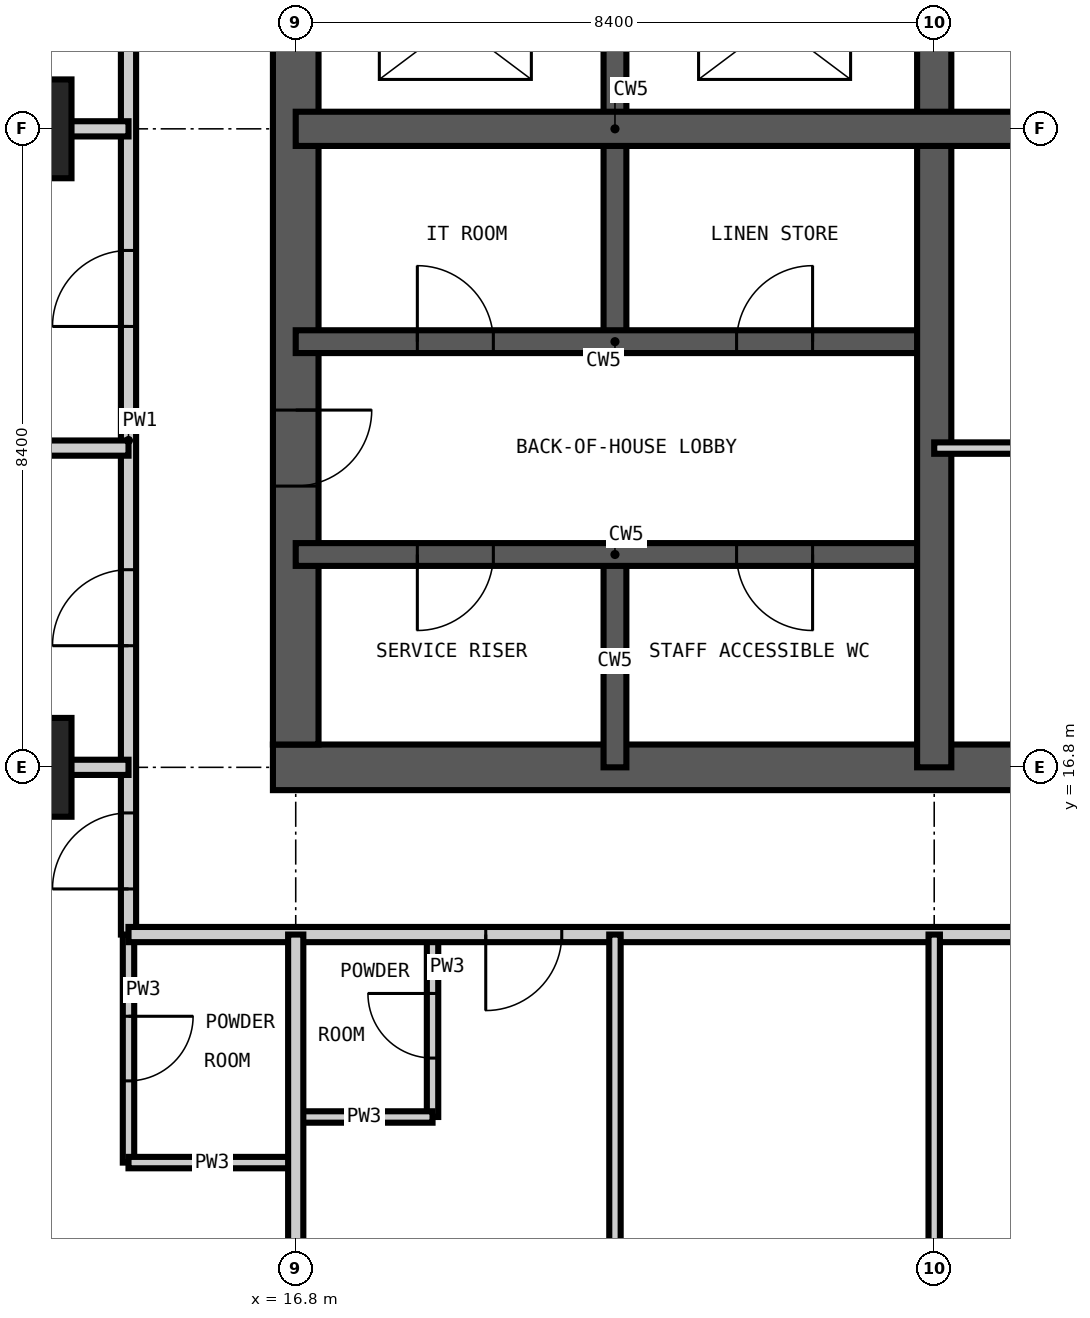
"""IFC4 building model, lengths in metres.
Left out: names, types, materials, properties, quantities, classifications, styles, units other than length and angle.
Written with IfcOpenShell. Run it as: python <this file> out.ifc"""

import sys

from ifc_helpers import new_model, si_unit, direction, frame, frame_2d, origin, origin_2d, place, context, subcontext, project, spatial, rectangle, extrude, element, fill, save


model = new_model("IFC4")
c1 = context("Model", 3, precision=1e-05, world=origin(), true_north=direction((0.0, 1.0)))
c2 = subcontext(c1, "Body", "Model", "MODEL_VIEW")
j1 = project(units=[si_unit("LENGTHUNIT", "METRE"), si_unit("PLANEANGLEUNIT", "RADIAN")], contexts=[c1])
p1 = place(None, origin())
s1 = spatial("IfcSite", under=j1, at=p1, CompositionType="ELEMENT")
p2 = place(p1, origin())
s2 = spatial("IfcBuilding", under=s1, at=p2, CompositionType="ELEMENT")
p3 = place(p2, frame((0.0, 0.0, 205.8)))
s3 = spatial("IfcBuildingStorey", under=s2, at=p3, CompositionType="ELEMENT", Elevation=205.8)
for number, where, z_axis, x_axis in (
    (1, (13.2, 16.8, -0.35), (0.0, 0.0, 1.0), (1.0, 0.0, 0.0)),
    (2, (13.2, 25.2, -0.35), (0.0, 0.0, 1.0), (1.0, 0.0, 0.0)),
):
    element("IfcColumn", number, at=place(p3, frame(where, z_axis=z_axis, x_axis=x_axis)), inside=s3, PredefinedType="COLUMN", context=c2, shape_type="SweptSolid", body=[
        extrude(rectangle(XDim=1.3, YDim=1.3, at=origin_2d()), origin(), (0.0, 0.0, 1.0), 3.6),
    ])
p4 = place(p3, frame((16.5, 16.8, -0.35), z_axis=(0.0, 0.0, 1.0), x_axis=(1.0, 0.0, 0.0)))
e3 = element("IfcWall", 3, at=p4, inside=s3, PredefinedType="SHEAR", context=c2, shape_type="SweptSolid", body=[
    extrude(rectangle(XDim=25.8, YDim=0.6, at=frame_2d((12.9, 0.0))), origin(), (0.0, 0.0, 1.0), 3.6),
])
p5 = place(p4, frame((12.4, 0.0, 0.35)))
e4 = element("IfcOpeningElement", 4, at=p5, cuts=e3, PredefinedType="OPENING", context=c2, shape_type="SweptSolid", body=[
    extrude(rectangle(XDim=1.0, YDim=2.1, at=frame_2d((0.5, 1.05))), frame((0.0, 0.31, 0.0), z_axis=(0.0, -1.0, 0.0), x_axis=(1.0, 0.0, 0.0)), (0.0, 0.0, 1.0), 0.62),
])
p6 = place(p4, frame((18.7, 0.0, 0.35)))
e5 = element("IfcOpeningElement", 5, at=p6, cuts=e3, PredefinedType="OPENING", context=c2, shape_type="SweptSolid", body=[
    extrude(rectangle(XDim=1.0, YDim=2.1, at=frame_2d((0.5, 1.05))), frame((0.0, 0.31, 0.0), z_axis=(0.0, -1.0, 0.0), x_axis=(1.0, 0.0, 0.0)), (0.0, 0.0, 1.0), 0.62),
])
p7 = place(p3, frame((16.8, 41.7, -0.35), z_axis=(0.0, 0.0, 1.0), x_axis=(0.0, -1.0, 0.0)))
e6 = element("IfcWall", 6, at=p7, inside=s3, PredefinedType="SHEAR", context=c2, shape_type="SweptSolid", body=[
    extrude(rectangle(XDim=24.6, YDim=0.6, at=frame_2d((12.3, 0.0))), origin(), (0.0, 0.0, 1.0), 3.6),
])
p8 = place(p7, frame((11.4, 0.0, 0.35)))
e7 = element("IfcOpeningElement", 7, at=p8, cuts=e6, PredefinedType="OPENING", context=c2, shape_type="SweptSolid", body=[
    extrude(rectangle(XDim=1.8, YDim=2.2, at=frame_2d((0.9, 1.1))), frame((0.0, 0.31, 0.0), z_axis=(0.0, -1.0, 0.0), x_axis=(1.0, 0.0, 0.0)), (0.0, 0.0, 1.0), 0.62),
])
p9 = place(p7, frame((20.2, 0.0, 0.35)))
e8 = element("IfcOpeningElement", 8, at=p9, cuts=e6, PredefinedType="OPENING", context=c2, shape_type="SweptSolid", body=[
    extrude(rectangle(XDim=1.0, YDim=2.1, at=frame_2d((0.5, 1.05))), frame((0.0, 0.31, 0.0), z_axis=(0.0, -1.0, 0.0), x_axis=(1.0, 0.0, 0.0)), (0.0, 0.0, 1.0), 0.62),
])
p10 = place(p7, frame((5.5, 0.0, 0.35)))
e9 = element("IfcOpeningElement", 9, at=p10, cuts=e6, PredefinedType="OPENING", context=c2, shape_type="SweptSolid", body=[
    extrude(rectangle(XDim=1.0, YDim=2.1, at=frame_2d((0.5, 1.05))), frame((0.0, 0.31, 0.0), z_axis=(0.0, -1.0, 0.0), x_axis=(1.0, 0.0, 0.0)), (0.0, 0.0, 1.0), 0.62),
])
p11 = place(p3, frame((21.0, 16.8, -0.35), z_axis=(0.0, 0.0, 1.0), x_axis=(0.0, 1.0, 0.0)))
e10 = element("IfcWall", 10, at=p11, inside=s3, PredefinedType="SHEAR", context=c2, shape_type="SweptSolid", body=[
    extrude(rectangle(XDim=2.8, YDim=0.3, at=frame_2d((1.4, 0.0))), origin(), (0.0, 0.0, 1.0), 3.6),
])
p12 = place(p3, frame((21.0, 22.4, -0.35), z_axis=(0.0, 0.0, 1.0), x_axis=(0.0, 1.0, 0.0)))
e11 = element("IfcWall", 11, at=p12, inside=s3, PredefinedType="SHEAR", context=c2, shape_type="SweptSolid", body=[
    extrude(rectangle(XDim=5.6, YDim=0.3, at=frame_2d((2.8, 0.0))), origin(), (0.0, 0.0, 1.0), 3.6),
])
p13 = place(p3, frame((16.8, 19.6, -0.35), z_axis=(0.0, 0.0, 1.0), x_axis=(1.0, 0.0, 0.0)))
e12 = element("IfcWall", 12, at=p13, inside=s3, PredefinedType="SHEAR", context=c2, shape_type="SweptSolid", body=[
    extrude(rectangle(XDim=8.4, YDim=0.3, at=frame_2d((4.2, 0.0))), origin(), (0.0, 0.0, 1.0), 3.6),
])
p14 = place(p13, frame((1.6, 0.0, 0.35)))
e13 = element("IfcOpeningElement", 13, at=p14, cuts=e12, PredefinedType="OPENING", context=c2, shape_type="SweptSolid", body=[
    extrude(rectangle(XDim=1.0, YDim=2.1, at=frame_2d((0.5, 1.05))), frame((0.0, 0.16, 0.0), z_axis=(0.0, -1.0, 0.0), x_axis=(1.0, 0.0, 0.0)), (0.0, 0.0, 1.0), 0.32),
])
p15 = place(p13, frame((5.8, 0.0, 0.35)))
e14 = element("IfcOpeningElement", 14, at=p15, cuts=e12, PredefinedType="OPENING", context=c2, shape_type="SweptSolid", body=[
    extrude(rectangle(XDim=1.0, YDim=2.1, at=frame_2d((0.5, 1.05))), frame((0.0, 0.16, 0.0), z_axis=(0.0, -1.0, 0.0), x_axis=(1.0, 0.0, 0.0)), (0.0, 0.0, 1.0), 0.32),
])
p16 = place(p3, frame((16.8, 22.4, -0.35), z_axis=(0.0, 0.0, 1.0), x_axis=(1.0, 0.0, 0.0)))
e15 = element("IfcWall", 15, at=p16, inside=s3, PredefinedType="SHEAR", context=c2, shape_type="SweptSolid", body=[
    extrude(rectangle(XDim=8.4, YDim=0.3, at=frame_2d((4.2, 0.0))), origin(), (0.0, 0.0, 1.0), 3.6),
])
p17 = place(p16, frame((1.6, 0.0, 0.35)))
e16 = element("IfcOpeningElement", 16, at=p17, cuts=e15, PredefinedType="OPENING", context=c2, shape_type="SweptSolid", body=[
    extrude(rectangle(XDim=1.0, YDim=2.1, at=frame_2d((0.5, 1.05))), frame((0.0, 0.16, 0.0), z_axis=(0.0, -1.0, 0.0), x_axis=(1.0, 0.0, 0.0)), (0.0, 0.0, 1.0), 0.32),
])
p18 = place(p16, frame((5.8, 0.0, 0.35)))
e17 = element("IfcOpeningElement", 17, at=p18, cuts=e15, PredefinedType="OPENING", context=c2, shape_type="SweptSolid", body=[
    extrude(rectangle(XDim=1.0, YDim=2.1, at=frame_2d((0.5, 1.05))), frame((0.0, 0.16, 0.0), z_axis=(0.0, -1.0, 0.0), x_axis=(1.0, 0.0, 0.0)), (0.0, 0.0, 1.0), 0.32),
])
for number, where, z_axis, x_axis in (
    (18, (25.2, 16.8, -0.35), (0.0, 0.0, 1.0), (0.0, 1.0, 0.0)),
    (19, (16.8, 25.2, -0.35), (0.0, 0.0, 1.0), (1.0, 0.0, 0.0)),
):
    element("IfcWall", number, at=place(p3, frame(where, z_axis=z_axis, x_axis=x_axis)), inside=s3, PredefinedType="SHEAR", context=c2, shape_type="SweptSolid", body=[
        extrude(rectangle(XDim=25.2, YDim=0.45, at=frame_2d((12.6, 0.0))), origin(), (0.0, 0.0, 1.0), 3.6),
    ])
p19 = place(p3, frame((14.6, 11.6, 0.0), z_axis=(0.0, 0.0, 1.0), x_axis=(0.0, 1.0, 0.0)))
e20 = element("IfcWall", 20, at=p19, inside=s3, PredefinedType="PARTITIONING", context=c2, shape_type="SweptSolid", body=[
    extrude(rectangle(XDim=3.0, YDim=0.15, at=frame_2d((1.5, 0.0))), origin(), (0.0, 0.0, 1.0), 3.25),
])
p20 = place(p19, frame((1.075, 0.0, 0.0)))
e21 = element("IfcOpeningElement", 21, at=p20, cuts=e20, PredefinedType="OPENING", context=c2, shape_type="SweptSolid", body=[
    extrude(rectangle(XDim=0.85, YDim=2.1, at=frame_2d((0.425, 1.05))), frame((0.0, 0.085, 0.0), z_axis=(0.0, -1.0, 0.0), x_axis=(1.0, 0.0, 0.0)), (0.0, 0.0, 1.0), 0.17),
])
p21 = place(p3, frame((18.6, 12.2, 0.0), z_axis=(0.0, 0.0, 1.0), x_axis=(0.0, 1.0, 0.0)))
e22 = element("IfcWall", 22, at=p21, inside=s3, PredefinedType="PARTITIONING", context=c2, shape_type="SweptSolid", body=[
    extrude(rectangle(XDim=2.4, YDim=0.15, at=frame_2d((1.2, 0.0))), origin(), (0.0, 0.0, 1.0), 3.25),
])
p22 = place(p21, frame((0.775, 0.0, 0.0)))
e23 = element("IfcOpeningElement", 23, at=p22, cuts=e22, PredefinedType="OPENING", context=c2, shape_type="SweptSolid", body=[
    extrude(rectangle(XDim=0.85, YDim=2.1, at=frame_2d((0.425, 1.05))), frame((0.0, 0.085, 0.0), z_axis=(0.0, -1.0, 0.0), x_axis=(1.0, 0.0, 0.0)), (0.0, 0.0, 1.0), 0.17),
])
p23 = place(p3, frame((14.6, 11.6, 0.0), z_axis=(0.0, 0.0, 1.0), x_axis=(1.0, 0.0, 0.0)))
e24 = element("IfcWall", 24, at=p23, inside=s3, PredefinedType="PARTITIONING", context=c2, shape_type="SweptSolid", body=[
    extrude(rectangle(XDim=2.2, YDim=0.15, at=frame_2d((1.1, 0.0))), origin(), (0.0, 0.0, 1.0), 3.25),
])
p24 = place(p3, frame((16.8, 12.2, 0.0), z_axis=(0.0, 0.0, 1.0), x_axis=(1.0, 0.0, 0.0)))
e25 = element("IfcWall", 25, at=p24, inside=s3, PredefinedType="PARTITIONING", context=c2, shape_type="SweptSolid", body=[
    extrude(rectangle(XDim=1.8, YDim=0.15, at=frame_2d((0.9, 0.0))), origin(), (0.0, 0.0, 1.0), 3.25),
])
p25 = place(p3, frame((14.6, 14.6, 0.0), z_axis=(0.0, 0.0, 1.0), x_axis=(0.0, 1.0, 0.0)))
e26 = element("IfcWall", 26, at=p25, inside=s3, PredefinedType="PARTITIONING", context=c2, shape_type="SweptSolid", body=[
    extrude(rectangle(XDim=13.0, YDim=0.2, at=frame_2d((6.5, 0.0))), origin(), (0.0, 0.0, 1.0), 3.25),
])
p26 = place(p25, frame((3.8, 0.0, 0.0)))
e27 = element("IfcOpeningElement", 27, at=p26, cuts=e26, PredefinedType="OPENING", context=c2, shape_type="SweptSolid", body=[
    extrude(rectangle(XDim=1.0, YDim=2.2, at=frame_2d((0.5, 1.1))), frame((0.0, 0.11, 0.0), z_axis=(0.0, -1.0, 0.0), x_axis=(1.0, 0.0, 0.0)), (0.0, 0.0, 1.0), 0.22),
])
p27 = place(p25, frame((8.0, 0.0, 0.0)))
e28 = element("IfcOpeningElement", 28, at=p27, cuts=e26, PredefinedType="OPENING", context=c2, shape_type="SweptSolid", body=[
    extrude(rectangle(XDim=1.0, YDim=2.2, at=frame_2d((0.5, 1.1))), frame((0.0, 0.11, 0.0), z_axis=(0.0, -1.0, 0.0), x_axis=(1.0, 0.0, 0.0)), (0.0, 0.0, 1.0), 0.22),
])
p28 = place(p25, frame((0.6, 0.0, 0.0)))
e29 = element("IfcOpeningElement", 29, at=p28, cuts=e26, PredefinedType="OPENING", context=c2, shape_type="SweptSolid", body=[
    extrude(rectangle(XDim=1.0, YDim=2.2, at=frame_2d((0.5, 1.1))), frame((0.0, 0.11, 0.0), z_axis=(0.0, -1.0, 0.0), x_axis=(1.0, 0.0, 0.0)), (0.0, 0.0, 1.0), 0.22),
])
p29 = place(p3, frame((44.8, 14.6, 0.0), z_axis=(0.0, 0.0, 1.0), x_axis=(-1.0, 0.0, 0.0)))
e30 = element("IfcWall", 30, at=p29, inside=s3, PredefinedType="PARTITIONING", context=c2, shape_type="SweptSolid", body=[
    extrude(rectangle(XDim=30.2, YDim=0.2, at=frame_2d((15.1, 0.0))), origin(), (0.0, 0.0, 1.0), 3.25),
])
p30 = place(p29, frame((24.5, 0.0, 0.0)))
e31 = element("IfcOpeningElement", 31, at=p30, cuts=e30, PredefinedType="OPENING", context=c2, shape_type="SweptSolid", body=[
    extrude(rectangle(XDim=1.0, YDim=2.2, at=frame_2d((0.5, 1.1))), frame((0.0, 0.11, 0.0), z_axis=(0.0, -1.0, 0.0), x_axis=(1.0, 0.0, 0.0)), (0.0, 0.0, 1.0), 0.22),
])
p31 = place(p29, frame((12.8, 0.0, 0.0)))
e32 = element("IfcOpeningElement", 32, at=p31, cuts=e30, PredefinedType="OPENING", context=c2, shape_type="SweptSolid", body=[
    extrude(rectangle(XDim=1.0, YDim=2.2, at=frame_2d((0.5, 1.1))), frame((0.0, 0.11, 0.0), z_axis=(0.0, -1.0, 0.0), x_axis=(1.0, 0.0, 0.0)), (0.0, 0.0, 1.0), 0.22),
])
p32 = place(p29, frame((6.5, 0.0, 0.0)))
e33 = element("IfcOpeningElement", 33, at=p32, cuts=e30, PredefinedType="OPENING", context=c2, shape_type="SweptSolid", body=[
    extrude(rectangle(XDim=1.0, YDim=2.2, at=frame_2d((0.5, 1.1))), frame((0.0, 0.11, 0.0), z_axis=(0.0, -1.0, 0.0), x_axis=(1.0, 0.0, 0.0)), (0.0, 0.0, 1.0), 0.22),
])
for number, where, z_axis, x_axis in (
    (34, (16.8, 4.182, 0.0), (0.0, 0.0, 1.0), (0.0, 1.0, 0.0)),
    (35, (4.182, 16.8, 0.0), (0.0, 0.0, 1.0), (1.0, 0.0, 0.0)),
    (36, (4.182, 21.0, 0.0), (0.0, 0.0, 1.0), (1.0, 0.0, 0.0)),
    (37, (4.182, 25.2, 0.0), (0.0, 0.0, 1.0), (1.0, 0.0, 0.0)),
):
    element("IfcWall", number, at=place(p3, frame(where, z_axis=z_axis, x_axis=x_axis)), inside=s3, PredefinedType="PARTITIONING", context=c2, shape_type="SweptSolid", body=[
        extrude(rectangle(XDim=10.418, YDim=0.2, at=frame_2d((5.209, 0.0))), origin(), (0.0, 0.0, 1.0), 3.25),
    ])
p33 = place(p3, frame((21.0, 4.182, 0.0), z_axis=(0.0, 0.0, 1.0), x_axis=(0.0, 1.0, 0.0)))
e38 = element("IfcWall", 38, at=p33, inside=s3, PredefinedType="PARTITIONING", context=c2, shape_type="SweptSolid", body=[
    extrude(rectangle(XDim=10.418, YDim=0.15, at=frame_2d((5.209, 0.0))), origin(), (0.0, 0.0, 1.0), 3.25),
])
p34 = place(p33, frame((4.768, 0.0, 0.0)))
e39 = element("IfcOpeningElement", 39, at=p34, cuts=e38, PredefinedType="OPENING", context=c2, shape_type="SweptSolid", body=[
    extrude(rectangle(XDim=0.9, YDim=2.1, at=frame_2d((0.45, 1.05))), frame((0.0, 0.085, 0.0), z_axis=(0.0, -1.0, 0.0), x_axis=(1.0, 0.0, 0.0)), (0.0, 0.0, 1.0), 0.17),
])
p35 = place(p3, frame((25.2, 4.182, 0.0), z_axis=(0.0, 0.0, 1.0), x_axis=(0.0, 1.0, 0.0)))
e40 = element("IfcWall", 40, at=p35, inside=s3, PredefinedType="PARTITIONING", context=c2, shape_type="SweptSolid", body=[
    extrude(rectangle(XDim=10.418, YDim=0.15, at=frame_2d((5.209, 0.0))), origin(), (0.0, 0.0, 1.0), 3.25),
])
p36 = place(p35, frame((4.768, 0.0, 0.0)))
e41 = element("IfcOpeningElement", 41, at=p36, cuts=e40, PredefinedType="OPENING", context=c2, shape_type="SweptSolid", body=[
    extrude(rectangle(XDim=0.9, YDim=2.1, at=frame_2d((0.45, 1.05))), frame((0.0, 0.085, 0.0), z_axis=(0.0, -1.0, 0.0), x_axis=(1.0, 0.0, 0.0)), (0.0, 0.0, 1.0), 0.17),
])
p37 = place(p3, frame((25.2, 21.0, 0.0), z_axis=(0.0, 0.0, 1.0), x_axis=(1.0, 0.0, 0.0)))
e42 = element("IfcWall", 42, at=p37, inside=s3, PredefinedType="PARTITIONING", context=c2, shape_type="SweptSolid", body=[
    extrude(rectangle(XDim=8.4, YDim=0.15, at=frame_2d((4.2, 0.0))), origin(), (0.0, 0.0, 1.0), 3.25),
])
p38 = place(p37, frame((3.7, 0.0, 0.0)))
e43 = element("IfcOpeningElement", 43, at=p38, cuts=e42, PredefinedType="OPENING", context=c2, shape_type="SweptSolid", body=[
    extrude(rectangle(XDim=1.0, YDim=2.1, at=frame_2d((0.5, 1.05))), frame((0.0, 0.085, 0.0), z_axis=(0.0, -1.0, 0.0), x_axis=(1.0, 0.0, 0.0)), (0.0, 0.0, 1.0), 0.17),
])
p39 = place(p30, origin())
e44 = element("IfcDoor", 44, at=p39, inside=s3, OperationType="SINGLE_SWING_RIGHT", PredefinedType="DOOR", context=c2, shape_type="SweptSolid", body=[
    extrude(rectangle(XDim=1.0, YDim=2.2, at=frame_2d((0.5, 1.1))), frame((0.0, 0.025, 0.0), z_axis=(0.0, -1.0, 0.0), x_axis=(1.0, 0.0, 0.0)), (0.0, 0.0, 1.0), 0.05),
])
fill(e31, e44)
p40 = place(p22, origin())
e45 = element("IfcDoor", 45, at=p40, inside=s3, OperationType="SINGLE_SWING_RIGHT", PredefinedType="DOOR", context=c2, shape_type="SweptSolid", body=[
    extrude(rectangle(XDim=0.85, YDim=2.1, at=frame_2d((0.425, 1.05))), frame((0.0, 0.025, 0.0), z_axis=(0.0, -1.0, 0.0), x_axis=(1.0, 0.0, 0.0)), (0.0, 0.0, 1.0), 0.05),
])
fill(e23, e45)
p41 = place(p26, origin())
e46 = element("IfcDoor", 46, at=p41, inside=s3, OperationType="SINGLE_SWING_LEFT", PredefinedType="DOOR", context=c2, shape_type="SweptSolid", body=[
    extrude(rectangle(XDim=1.0, YDim=2.2, at=frame_2d((0.5, 1.1))), frame((0.0, 0.025, 0.0), z_axis=(0.0, -1.0, 0.0), x_axis=(1.0, 0.0, 0.0)), (0.0, 0.0, 1.0), 0.05),
])
fill(e27, e46)
p42 = place(p27, origin())
e47 = element("IfcDoor", 47, at=p42, inside=s3, OperationType="SINGLE_SWING_LEFT", PredefinedType="DOOR", context=c2, shape_type="SweptSolid", body=[
    extrude(rectangle(XDim=1.0, YDim=2.2, at=frame_2d((0.5, 1.1))), frame((0.0, 0.025, 0.0), z_axis=(0.0, -1.0, 0.0), x_axis=(1.0, 0.0, 0.0)), (0.0, 0.0, 1.0), 0.05),
])
fill(e28, e47)
p43 = place(p28, origin())
e48 = element("IfcDoor", 48, at=p43, inside=s3, OperationType="SINGLE_SWING_LEFT", PredefinedType="DOOR", context=c2, shape_type="SweptSolid", body=[
    extrude(rectangle(XDim=1.0, YDim=2.2, at=frame_2d((0.5, 1.1))), frame((0.0, 0.025, 0.0), z_axis=(0.0, -1.0, 0.0), x_axis=(1.0, 0.0, 0.0)), (0.0, 0.0, 1.0), 0.05),
])
fill(e29, e48)
p44 = place(p20, frame((0.85, 0.0, 0.0), z_axis=(0.0, 0.0, 1.0), x_axis=(-1.0, 0.0, 0.0)))
e49 = element("IfcDoor", 49, at=p44, inside=s3, OperationType="SINGLE_SWING_LEFT", PredefinedType="DOOR", context=c2, shape_type="SweptSolid", body=[
    extrude(rectangle(XDim=0.85, YDim=2.1, at=frame_2d((0.425, 1.05))), frame((0.0, 0.025, 0.0), z_axis=(0.0, -1.0, 0.0), x_axis=(1.0, 0.0, 0.0)), (0.0, 0.0, 1.0), 0.05),
])
fill(e21, e49)
p45 = place(p14, frame((1.0, 0.0, 0.0), z_axis=(0.0, 0.0, 1.0), x_axis=(-1.0, 0.0, 0.0)))
e50 = element("IfcDoor", 50, at=p45, inside=s3, OperationType="SINGLE_SWING_RIGHT", PredefinedType="DOOR", context=c2, shape_type="SweptSolid", body=[
    extrude(rectangle(XDim=1.0, YDim=2.1, at=frame_2d((0.5, 1.05))), frame((0.0, 0.025, 0.0), z_axis=(0.0, -1.0, 0.0), x_axis=(1.0, 0.0, 0.0)), (0.0, 0.0, 1.0), 0.05),
])
fill(e13, e50)
p46 = place(p15, frame((1.0, 0.0, 0.0), z_axis=(0.0, 0.0, 1.0), x_axis=(-1.0, 0.0, 0.0)))
e51 = element("IfcDoor", 51, at=p46, inside=s3, OperationType="SINGLE_SWING_LEFT", PredefinedType="DOOR", context=c2, shape_type="SweptSolid", body=[
    extrude(rectangle(XDim=1.0, YDim=2.1, at=frame_2d((0.5, 1.05))), frame((0.0, 0.025, 0.0), z_axis=(0.0, -1.0, 0.0), x_axis=(1.0, 0.0, 0.0)), (0.0, 0.0, 1.0), 0.05),
])
fill(e14, e51)
p47 = place(p17, origin())
e52 = element("IfcDoor", 52, at=p47, inside=s3, OperationType="SINGLE_SWING_LEFT", PredefinedType="DOOR", context=c2, shape_type="SweptSolid", body=[
    extrude(rectangle(XDim=1.0, YDim=2.1, at=frame_2d((0.5, 1.05))), frame((0.0, 0.025, 0.0), z_axis=(0.0, -1.0, 0.0), x_axis=(1.0, 0.0, 0.0)), (0.0, 0.0, 1.0), 0.05),
])
fill(e16, e52)
p48 = place(p18, origin())
e53 = element("IfcDoor", 53, at=p48, inside=s3, OperationType="SINGLE_SWING_RIGHT", PredefinedType="DOOR", context=c2, shape_type="SweptSolid", body=[
    extrude(rectangle(XDim=1.0, YDim=2.1, at=frame_2d((0.5, 1.05))), frame((0.0, 0.025, 0.0), z_axis=(0.0, -1.0, 0.0), x_axis=(1.0, 0.0, 0.0)), (0.0, 0.0, 1.0), 0.05),
])
fill(e17, e53)
p49 = place(p9, origin())
e54 = element("IfcDoor", 54, at=p49, inside=s3, OperationType="SINGLE_SWING_LEFT", PredefinedType="DOOR", context=c2, shape_type="SweptSolid", body=[
    extrude(rectangle(XDim=1.0, YDim=2.1, at=frame_2d((0.5, 1.05))), frame((0.0, 0.025, 0.0), z_axis=(0.0, -1.0, 0.0), x_axis=(1.0, 0.0, 0.0)), (0.0, 0.0, 1.0), 0.05),
])
fill(e8, e54)
save(model, sys.argv[1])
